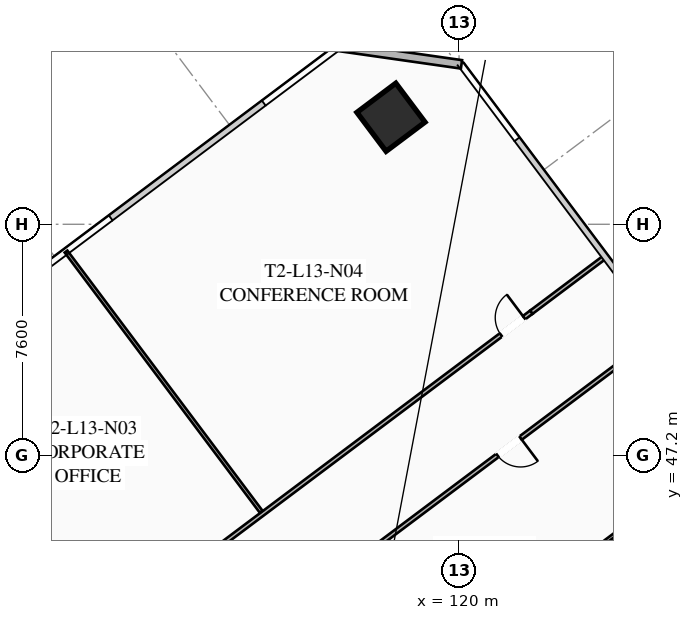
"""IFC4 building model, lengths in metres.
Left out: names, types, materials, properties, quantities, classifications, styles, units other than length and angle.
Written with IfcOpenShell. Run it as: python <this file> out.ifc"""

import sys

from ifc_helpers import new_model, si_unit, direction, frame, frame_2d, origin, origin_2d, place, context, subcontext, project, spatial, rectangle, hollow_rectangle, extrude, element, fill, save


model = new_model("IFC4")
c1 = context("Model", 3, precision=1e-05, world=origin(), true_north=direction((0.0, 1.0)))
c2 = subcontext(c1, "Body", "Model", "MODEL_VIEW")
j1 = project(units=[si_unit("LENGTHUNIT", "METRE"), si_unit("PLANEANGLEUNIT", "RADIAN")], contexts=[c1])
p1 = place(None, origin())
s1 = spatial("IfcSite", under=j1, at=p1, CompositionType="ELEMENT")
p2 = place(p1, origin())
s2 = spatial("IfcBuilding", under=s1, at=p2, CompositionType="ELEMENT")
p3 = place(p2, frame((0.0, 0.0, 53.0)))
s3 = spatial("IfcBuildingStorey", under=s2, at=p3, CompositionType="ELEMENT", Elevation=53.0)
p4 = place(p3, frame((117.76, 58.32, 0.0), z_axis=(0.0, 0.0, 1.0), x_axis=(0.799999996291, 0.600000004945, 0.0)))
e1 = element("IfcColumn", 1, at=p4, inside=s3, PredefinedType="COLUMN", context=c2, shape_type="SweptSolid", body=[
    extrude(hollow_rectangle(XDim=1.6, YDim=1.6, WallThickness=0.06, at=origin_2d()), origin(), (0.0, 0.0, 1.0), 3.35),
])
p5 = place(p3, frame((116.02, 60.64, 0.0), z_axis=(0.0, 0.0, 1.0), x_axis=(0.989955445613, -0.14137968631, 0.0)))
e2 = element("IfcWall", 2, at=p5, inside=s3, PredefinedType="SOLIDWALL", context=c2, shape_type="SweptSolid", body=[
    extrude(rectangle(XDim=4.101, YDim=0.28, at=frame_2d((2.051, 0.0))), origin(), (0.0, 0.0, 1.0), 3.35),
])
p6 = place(p3, frame((98.276, 33.832, 0.0), z_axis=(0.0, 0.0, 1.0), x_axis=(0.800001944698, 0.59999740706, 0.0)))
e3 = element("IfcWall", 3, at=p6, inside=s3, PredefinedType="PARTITIONING", context=c2, shape_type="SweptSolid", body=[
    extrude(rectangle(XDim=30.13, YDim=0.135, at=frame_2d((15.065, 0.0))), origin(), (0.0, 0.0, 1.0), 2.703),
])
p7 = place(p6, frame((0.3, 0.0, 0.0)))
e4 = element("IfcOpeningElement", 4, at=p7, cuts=e3, PredefinedType="OPENING", context=c2, shape_type="SweptSolid", body=[
    extrude(rectangle(XDim=0.95, YDim=2.05, at=frame_2d((0.475, 1.025))), frame((0.0, 0.077, 0.0), z_axis=(0.0, -1.0, 0.0), x_axis=(1.0, 0.0, 0.0)), (0.0, 0.0, 1.0), 0.155),
])
p8 = place(p6, frame((10.95, 0.0, 0.0)))
e5 = element("IfcOpeningElement", 5, at=p8, cuts=e3, PredefinedType="OPENING", context=c2, shape_type="SweptSolid", body=[
    extrude(rectangle(XDim=0.95, YDim=2.05, at=frame_2d((0.475, 1.025))), frame((0.0, 0.077, 0.0), z_axis=(0.0, -1.0, 0.0), x_axis=(1.0, 0.0, 0.0)), (0.0, 0.0, 1.0), 0.155),
])
p9 = place(p6, frame((14.95, 0.0, 0.0)))
e6 = element("IfcOpeningElement", 6, at=p9, cuts=e3, PredefinedType="OPENING", context=c2, shape_type="SweptSolid", body=[
    extrude(rectangle(XDim=0.95, YDim=2.05, at=frame_2d((0.475, 1.025))), frame((0.0, 0.077, 0.0), z_axis=(0.0, -1.0, 0.0), x_axis=(1.0, 0.0, 0.0)), (0.0, 0.0, 1.0), 0.155),
])
p10 = place(p6, frame((28.88, 0.0, 0.0)))
e7 = element("IfcOpeningElement", 7, at=p10, cuts=e3, PredefinedType="OPENING", context=c2, shape_type="SweptSolid", body=[
    extrude(rectangle(XDim=0.95, YDim=2.05, at=frame_2d((0.475, 1.025))), frame((0.0, 0.077, 0.0), z_axis=(0.0, -1.0, 0.0), x_axis=(1.0, 0.0, 0.0)), (0.0, 0.0, 1.0), 0.155),
])
p11 = place(p3, frame((122.38, 51.91, 0.0), z_axis=(0.0, 0.0, 1.0), x_axis=(0.799990331366, 0.600012891296, 0.0)))
e8 = element("IfcWall", 8, at=p11, inside=s3, PredefinedType="PARTITIONING", context=c2, shape_type="SweptSolid", body=[
    extrude(rectangle(XDim=3.03, YDim=0.135, at=frame_2d((1.515, 0.0))), origin(), (0.0, 0.0, 1.0), 2.703),
])
for number, where, z_axis, x_axis in (
    (9, (108.052, 41.264, 0.0), (0.0, 0.0, 1.0), (-0.6, 0.8, 0.0)),
    (10, (113.492, 45.344, 0.0), (0.0, 0.0, 1.0), (-0.6, 0.8, 0.0)),
):
    element("IfcWall", number, at=place(p3, frame(where, z_axis=z_axis, x_axis=x_axis)), inside=s3, PredefinedType="PARTITIONING", context=c2, shape_type="SweptSolid", body=[
        extrude(rectangle(XDim=10.7, YDim=0.11, at=frame_2d((5.35, 0.0))), origin(), (0.0, 0.0, 1.0), 2.703),
    ])
p12 = place(p3, frame((126.664, 51.248, 0.0), z_axis=(0.0, 0.0, 1.0), x_axis=(-0.799995055373, -0.600006592779, 0.0)))
e11 = element("IfcWall", 11, at=p12, inside=s3, PredefinedType="PARTITIONING", context=c2, shape_type="SweptSolid", body=[
    extrude(rectangle(XDim=11.85, YDim=0.135, at=frame_2d((5.925, 0.0))), origin(), (0.0, 0.0, 1.0), 2.703),
])
p13 = place(p12, frame((5.8, 0.0, 0.0)))
e12 = element("IfcOpeningElement", 12, at=p13, cuts=e11, PredefinedType="OPENING", context=c2, shape_type="SweptSolid", body=[
    extrude(rectangle(XDim=0.95, YDim=2.05, at=frame_2d((0.475, 1.025))), frame((0.0, 0.077, 0.0), z_axis=(0.0, -1.0, 0.0), x_axis=(1.0, 0.0, 0.0)), (0.0, 0.0, 1.0), 0.155),
])
p14 = place(p3, frame((129.304, 47.728, 0.0), z_axis=(0.0, 0.0, 1.0), x_axis=(-0.8, -0.6, 0.0)))
e13 = element("IfcWall", 13, at=p14, inside=s3, PredefinedType="PARTITIONING", context=c2, shape_type="SweptSolid", body=[
    extrude(rectangle(XDim=10.0, YDim=0.11, at=frame_2d((5.0, 0.0))), origin(), (0.0, 0.0, 1.0), 2.703),
])
p15 = place(p10, origin())
e14 = element("IfcDoor", 14, at=p15, inside=s3, OperationType="SINGLE_SWING_RIGHT", PredefinedType="DOOR", context=c2, shape_type="SweptSolid", body=[
    extrude(rectangle(XDim=0.95, YDim=2.05, at=frame_2d((0.475, 1.025))), frame((0.0, 0.025, 0.0), z_axis=(0.0, -1.0, 0.0), x_axis=(1.0, 0.0, 0.0)), (0.0, 0.0, 1.0), 0.05),
])
fill(e7, e14)
p16 = place(p13, origin())
e15 = element("IfcDoor", 15, at=p16, inside=s3, OperationType="SINGLE_SWING_LEFT", PredefinedType="DOOR", context=c2, shape_type="SweptSolid", body=[
    extrude(rectangle(XDim=0.95, YDim=2.05, at=frame_2d((0.475, 1.025))), frame((0.0, 0.025, 0.0), z_axis=(0.0, -1.0, 0.0), x_axis=(1.0, 0.0, 0.0)), (0.0, 0.0, 1.0), 0.05),
])
fill(e12, e15)
save(model, sys.argv[1])
